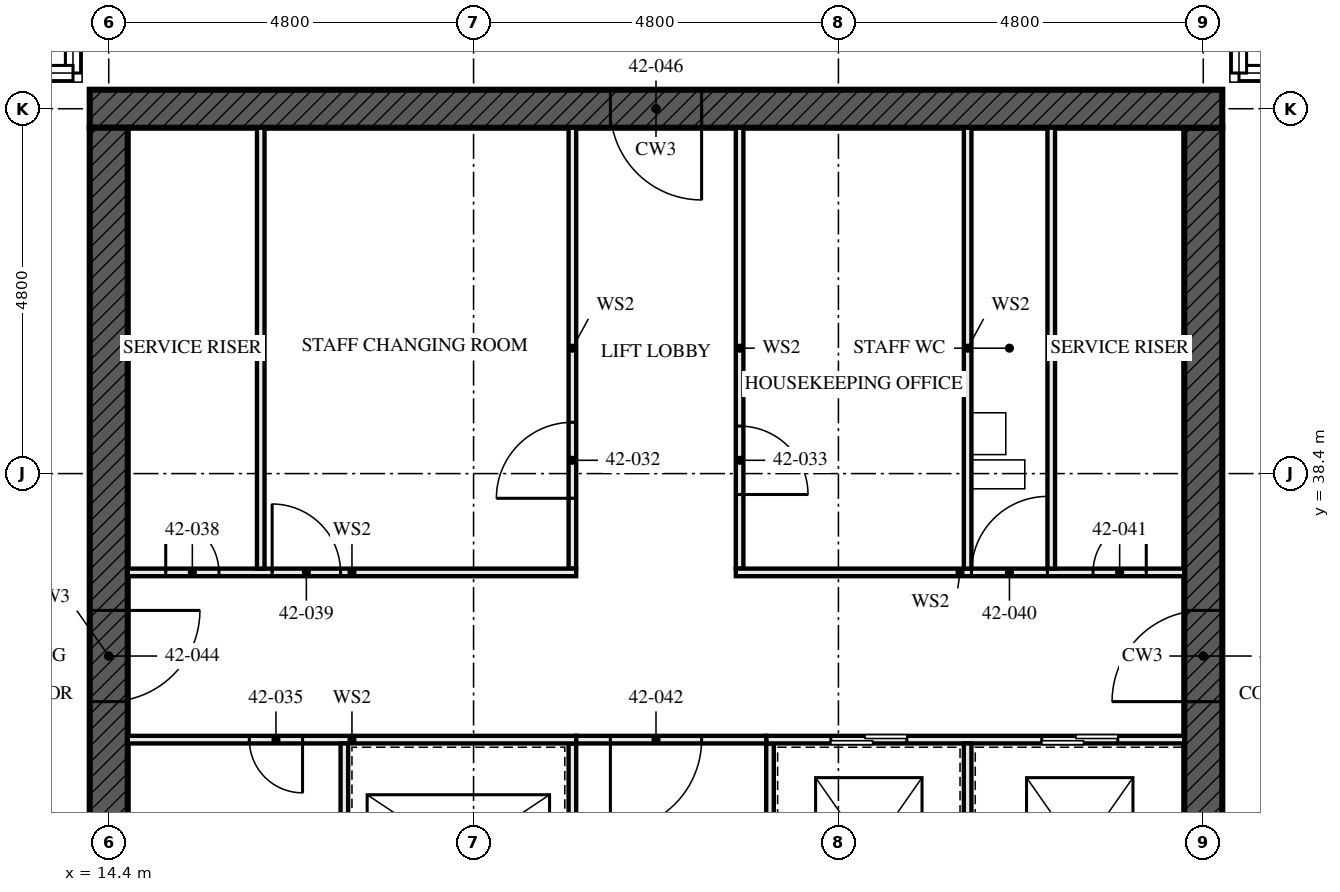
"""IFC4 building model, lengths in metres.
Left out: names, types, materials, properties, quantities, classifications, styles, units other than length and angle.
Written with IfcOpenShell. Run it as: python <this file> out.ifc"""

import sys

from ifc_helpers import new_model, si_unit, direction, frame, frame_2d, origin, place, context, subcontext, project, spatial, rectangle, extrude, element, fill, save


model = new_model("IFC4")
c1 = context("Model", 3, precision=1e-05, world=origin(), true_north=direction((0.0, 1.0)))
c2 = subcontext(c1, "Body", "Model", "MODEL_VIEW")
j1 = project(units=[si_unit("LENGTHUNIT", "METRE"), si_unit("PLANEANGLEUNIT", "RADIAN")], contexts=[c1])
p1 = place(None, origin())
s1 = spatial("IfcSite", under=j1, at=p1, CompositionType="ELEMENT")
p2 = place(p1, origin())
s2 = spatial("IfcBuilding", under=s1, at=p2, CompositionType="ELEMENT")
p3 = place(p2, frame((0.0, 0.0, 155.0)))
s3 = spatial("IfcBuildingStorey", under=s2, at=p3, CompositionType="ELEMENT", Elevation=155.0)
p4 = place(p3, frame((29.05, 43.2, -0.17), z_axis=(0.0, 0.0, 1.0), x_axis=(-1.0, 0.0, 0.0)))
e1 = element("IfcWall", 1, at=p4, inside=s3, PredefinedType="SHEAR", context=c2, shape_type="SweptSolid", body=[
    extrude(rectangle(XDim=14.9, YDim=0.5, at=frame_2d((7.45, 0.0))), origin(), (0.0, 0.0, 1.0), 3.5),
])
p5 = place(p4, frame((6.85, 0.0, 0.17)))
e2 = element("IfcOpeningElement", 2, at=p5, cuts=e1, PredefinedType="OPENING", context=c2, shape_type="SweptSolid", body=[
    extrude(rectangle(XDim=1.2, YDim=2.1, at=frame_2d((0.6, 1.05))), frame((0.0, 0.26, 0.0), z_axis=(0.0, -1.0, 0.0), x_axis=(1.0, 0.0, 0.0)), (0.0, 0.0, 1.0), 0.521),
])
p6 = place(p3, frame((14.4, 42.95, -0.17), z_axis=(0.0, 0.0, 1.0), x_axis=(0.0, -1.0, 0.0)))
e3 = element("IfcWall", 3, at=p6, inside=s3, PredefinedType="SHEAR", context=c2, shape_type="SweptSolid", body=[
    extrude(rectangle(XDim=13.9, YDim=0.5, at=frame_2d((6.95, 0.0))), origin(), (0.0, 0.0, 1.0), 3.5),
])
p7 = place(p6, frame((6.35, 0.0, 0.17)))
e4 = element("IfcOpeningElement", 4, at=p7, cuts=e3, PredefinedType="OPENING", context=c2, shape_type="SweptSolid", body=[
    extrude(rectangle(XDim=1.2, YDim=2.1, at=frame_2d((0.6, 1.05))), frame((0.0, 0.26, 0.0), z_axis=(0.0, -1.0, 0.0), x_axis=(1.0, 0.0, 0.0)), (0.0, 0.0, 1.0), 0.521),
])
p8 = place(p3, frame((28.8, 29.05, -0.17), z_axis=(0.0, 0.0, 1.0), x_axis=(0.0, 1.0, 0.0)))
e5 = element("IfcWall", 5, at=p8, inside=s3, PredefinedType="SHEAR", context=c2, shape_type="SweptSolid", body=[
    extrude(rectangle(XDim=13.9, YDim=0.5, at=frame_2d((6.95, 0.0))), origin(), (0.0, 0.0, 1.0), 3.5),
])
p9 = place(p8, frame((6.35, 0.0, 0.17)))
e6 = element("IfcOpeningElement", 6, at=p9, cuts=e5, PredefinedType="OPENING", context=c2, shape_type="SweptSolid", body=[
    extrude(rectangle(XDim=1.2, YDim=2.1, at=frame_2d((0.6, 1.05))), frame((0.0, 0.26, 0.0), z_axis=(0.0, -1.0, 0.0), x_axis=(1.0, 0.0, 0.0)), (0.0, 0.0, 1.0), 0.521),
])
for number, where, z_axis, x_axis in (
    (7, (16.4, 37.15, 0.0), (0.0, 0.0, 1.0), (0.0, 1.0, 0.0)),
    (8, (26.8, 37.15, 0.0), (0.0, 0.0, 1.0), (0.0, 1.0, 0.0)),
):
    element("IfcWall", number, at=place(p3, frame(where, z_axis=z_axis, x_axis=x_axis)), inside=s3, PredefinedType="SOLIDWALL", context=c2, shape_type="SweptSolid", body=[
        extrude(rectangle(XDim=5.8, YDim=0.1, at=frame_2d((2.9, 0.0))), origin(), (0.0, 0.0, 1.0), 3.33),
    ])
p10 = place(p3, frame((20.5, 29.05, 0.0), z_axis=(0.0, 0.0, 1.0), x_axis=(0.0, 1.0, 0.0)))
e9 = element("IfcWall", 9, at=p10, inside=s3, PredefinedType="SOLIDWALL", context=c2, shape_type="SweptSolid", body=[
    extrude(rectangle(XDim=5.8, YDim=0.1, at=frame_2d((2.9, 0.0))), origin(), (0.0, 0.0, 1.0), 3.33),
])
p11 = place(p10, frame((0.8, 0.0, 0.0)))
e10 = element("IfcOpeningElement", 10, at=p11, cuts=e9, PredefinedType="OPENING", context=c2, shape_type="SweptSolid", body=[
    extrude(rectangle(XDim=1.1, YDim=2.3, at=frame_2d((0.55, 1.15))), frame((0.0, 0.061, 0.0), z_axis=(0.0, -1.0, 0.0), x_axis=(1.0, 0.0, 0.0)), (0.0, 0.0, 1.0), 0.121),
])
p12 = place(p10, frame((3.775, 0.0, 0.0)))
e11 = element("IfcOpeningElement", 11, at=p12, cuts=e9, PredefinedType="OPENING", context=c2, shape_type="SweptSolid", body=[
    extrude(rectangle(XDim=1.1, YDim=2.3, at=frame_2d((0.55, 1.15))), frame((0.0, 0.061, 0.0), z_axis=(0.0, -1.0, 0.0), x_axis=(1.0, 0.0, 0.0)), (0.0, 0.0, 1.0), 0.121),
])
p13 = place(p3, frame((20.5, 37.15, 0.0), z_axis=(0.0, 0.0, 1.0), x_axis=(0.0, 1.0, 0.0)))
e12 = element("IfcWall", 12, at=p13, inside=s3, PredefinedType="SOLIDWALL", context=c2, shape_type="SweptSolid", body=[
    extrude(rectangle(XDim=5.8, YDim=0.1, at=frame_2d((2.9, 0.0))), origin(), (0.0, 0.0, 1.0), 3.33),
])
p14 = place(p13, frame((0.925, 0.0, 0.0)))
e13 = element("IfcOpeningElement", 13, at=p14, cuts=e12, PredefinedType="OPENING", context=c2, shape_type="SweptSolid", body=[
    extrude(rectangle(XDim=1.0, YDim=2.1, at=frame_2d((0.5, 1.05))), frame((0.0, 0.061, 0.0), z_axis=(0.0, -1.0, 0.0), x_axis=(1.0, 0.0, 0.0)), (0.0, 0.0, 1.0), 0.121),
])
p15 = place(p3, frame((22.7, 37.15, 0.0), z_axis=(0.0, 0.0, 1.0), x_axis=(0.0, 1.0, 0.0)))
e14 = element("IfcWall", 14, at=p15, inside=s3, PredefinedType="SOLIDWALL", context=c2, shape_type="SweptSolid", body=[
    extrude(rectangle(XDim=5.8, YDim=0.1, at=frame_2d((2.9, 0.0))), origin(), (0.0, 0.0, 1.0), 3.33),
])
p16 = place(p15, frame((0.975, 0.0, 0.0)))
e15 = element("IfcOpeningElement", 15, at=p16, cuts=e14, PredefinedType="OPENING", context=c2, shape_type="SweptSolid", body=[
    extrude(rectangle(XDim=0.9, YDim=2.1, at=frame_2d((0.45, 1.05))), frame((0.0, 0.061, 0.0), z_axis=(0.0, -1.0, 0.0), x_axis=(1.0, 0.0, 0.0)), (0.0, 0.0, 1.0), 0.121),
])
p17 = place(p3, frame((23.1, 29.05, 0.0), z_axis=(0.0, 0.0, 1.0), x_axis=(0.0, 1.0, 0.0)))
e16 = element("IfcWall", 16, at=p17, inside=s3, PredefinedType="SOLIDWALL", context=c2, shape_type="SweptSolid", body=[
    extrude(rectangle(XDim=5.8, YDim=0.1, at=frame_2d((2.9, 0.0))), origin(), (0.0, 0.0, 1.0), 3.33),
])
p18 = place(p17, frame((1.0, 0.0, 0.0)))
e17 = element("IfcOpeningElement", 17, at=p18, cuts=e16, PredefinedType="OPENING", context=c2, shape_type="SweptSolid", body=[
    extrude(rectangle(XDim=0.7, YDim=2.1, at=frame_2d((0.35, 1.05))), frame((0.0, 0.061, 0.0), z_axis=(0.0, -1.0, 0.0), x_axis=(1.0, 0.0, 0.0)), (0.0, 0.0, 1.0), 0.121),
])
p19 = place(p3, frame((14.65, 34.9, 0.0), z_axis=(0.0, 0.0, 1.0), x_axis=(1.0, 0.0, 0.0)))
e18 = element("IfcWall", 18, at=p19, inside=s3, PredefinedType="SOLIDWALL", context=c2, shape_type="SweptSolid", body=[
    extrude(rectangle(XDim=5.9, YDim=0.1, at=frame_2d((2.95, 0.0))), origin(), (0.0, 0.0, 1.0), 3.33),
])
p20 = place(p19, frame((1.6, 0.0, 0.0)))
e19 = element("IfcOpeningElement", 19, at=p20, cuts=e18, PredefinedType="OPENING", context=c2, shape_type="SweptSolid", body=[
    extrude(rectangle(XDim=0.7, YDim=2.1, at=frame_2d((0.35, 1.05))), frame((0.0, 0.061, 0.0), z_axis=(0.0, -1.0, 0.0), x_axis=(1.0, 0.0, 0.0)), (0.0, 0.0, 1.0), 0.121),
])
p21 = place(p3, frame((23.05, 34.9, 0.0), z_axis=(0.0, 0.0, 1.0), x_axis=(1.0, 0.0, 0.0)))
e20 = element("IfcWall", 20, at=p21, inside=s3, PredefinedType="SOLIDWALL", context=c2, shape_type="SweptSolid", body=[
    extrude(rectangle(XDim=5.5, YDim=0.1, at=frame_2d((2.75, 0.0))), origin(), (0.0, 0.0, 1.0), 3.33),
])
p22 = place(p21, frame((0.85, 0.0, 0.0)))
e21 = element("IfcOpeningElement", 21, at=p22, cuts=e20, PredefinedType="OPENING", context=c2, shape_type="SweptSolid", body=[
    extrude(rectangle(XDim=1.0, YDim=2.1, at=frame_2d((0.5, 1.05))), frame((0.0, 0.061, 0.0), z_axis=(0.0, -1.0, 0.0), x_axis=(1.0, 0.0, 0.0)), (0.0, 0.0, 1.0), 0.121),
])
p23 = place(p21, frame((3.625, 0.0, 0.0)))
e22 = element("IfcOpeningElement", 22, at=p23, cuts=e20, PredefinedType="OPENING", context=c2, shape_type="SweptSolid", body=[
    extrude(rectangle(XDim=1.0, YDim=2.1, at=frame_2d((0.5, 1.05))), frame((0.0, 0.061, 0.0), z_axis=(0.0, -1.0, 0.0), x_axis=(1.0, 0.0, 0.0)), (0.0, 0.0, 1.0), 0.121),
])
p24 = place(p3, frame((14.65, 37.1, 0.0), z_axis=(0.0, 0.0, 1.0), x_axis=(1.0, 0.0, 0.0)))
e23 = element("IfcWall", 23, at=p24, inside=s3, PredefinedType="SOLIDWALL", context=c2, shape_type="SweptSolid", body=[
    extrude(rectangle(XDim=5.9, YDim=0.1, at=frame_2d((2.95, 0.0))), origin(), (0.0, 0.0, 1.0), 3.33),
])
p25 = place(p24, frame((0.5, 0.0, 0.0)))
e24 = element("IfcOpeningElement", 24, at=p25, cuts=e23, PredefinedType="OPENING", context=c2, shape_type="SweptSolid", body=[
    extrude(rectangle(XDim=0.7, YDim=2.1, at=frame_2d((0.35, 1.05))), frame((0.0, 0.061, 0.0), z_axis=(0.0, -1.0, 0.0), x_axis=(1.0, 0.0, 0.0)), (0.0, 0.0, 1.0), 0.121),
])
p26 = place(p24, frame((1.9, 0.0, 0.0)))
e25 = element("IfcOpeningElement", 25, at=p26, cuts=e23, PredefinedType="OPENING", context=c2, shape_type="SweptSolid", body=[
    extrude(rectangle(XDim=0.9, YDim=2.1, at=frame_2d((0.45, 1.05))), frame((0.0, 0.061, 0.0), z_axis=(0.0, -1.0, 0.0), x_axis=(1.0, 0.0, 0.0)), (0.0, 0.0, 1.0), 0.121),
])
p27 = place(p3, frame((22.65, 37.1, 0.0), z_axis=(0.0, 0.0, 1.0), x_axis=(1.0, 0.0, 0.0)))
e26 = element("IfcWall", 26, at=p27, inside=s3, PredefinedType="SOLIDWALL", context=c2, shape_type="SweptSolid", body=[
    extrude(rectangle(XDim=5.9, YDim=0.1, at=frame_2d((2.95, 0.0))), origin(), (0.0, 0.0, 1.0), 3.33),
])
p28 = place(p27, frame((3.1, 0.0, 0.0)))
e27 = element("IfcOpeningElement", 27, at=p28, cuts=e26, PredefinedType="OPENING", context=c2, shape_type="SweptSolid", body=[
    extrude(rectangle(XDim=1.0, YDim=2.1, at=frame_2d((0.5, 1.05))), frame((0.0, 0.061, 0.0), z_axis=(0.0, -1.0, 0.0), x_axis=(1.0, 0.0, 0.0)), (0.0, 0.0, 1.0), 0.121),
])
p29 = place(p27, frame((4.7, 0.0, 0.0)))
e28 = element("IfcOpeningElement", 28, at=p29, cuts=e26, PredefinedType="OPENING", context=c2, shape_type="SweptSolid", body=[
    extrude(rectangle(XDim=0.7, YDim=2.1, at=frame_2d((0.35, 1.05))), frame((0.0, 0.061, 0.0), z_axis=(0.0, -1.0, 0.0), x_axis=(1.0, 0.0, 0.0)), (0.0, 0.0, 1.0), 0.121),
])
p30 = place(p3, frame((20.55, 34.9, 0.0), z_axis=(0.0, 0.0, 1.0), x_axis=(1.0, 0.0, 0.0)))
e29 = element("IfcWall", 29, at=p30, inside=s3, PredefinedType="SOLIDWALL", context=c2, shape_type="SweptSolid", body=[
    extrude(rectangle(XDim=2.5, YDim=0.1, at=frame_2d((1.25, 0.0))), origin(), (0.0, 0.0, 1.0), 3.33),
])
p31 = place(p30, frame((0.45, 0.0, 0.0)))
e30 = element("IfcOpeningElement", 30, at=p31, cuts=e29, PredefinedType="OPENING", context=c2, shape_type="SweptSolid", body=[
    extrude(rectangle(XDim=1.2, YDim=2.1, at=frame_2d((0.6, 1.05))), frame((0.0, 0.061, 0.0), z_axis=(0.0, -1.0, 0.0), x_axis=(1.0, 0.0, 0.0)), (0.0, 0.0, 1.0), 0.121),
])
for number, where, z_axis, x_axis in (
    (31, (17.5, 29.05, 0.0), (0.0, 0.0, 1.0), (0.0, 1.0, 0.0)),
    (32, (25.7, 37.15, 0.0), (0.0, 0.0, 1.0), (0.0, 1.0, 0.0)),
):
    element("IfcWall", number, at=place(p3, frame(where, z_axis=z_axis, x_axis=x_axis)), inside=s3, PredefinedType="SOLIDWALL", context=c2, shape_type="SweptSolid", body=[
        extrude(rectangle(XDim=5.8, YDim=0.1, at=frame_2d((2.9, 0.0))), origin(), (0.0, 0.0, 1.0), 3.33),
    ])
p32 = place(p3, frame((25.7, 31.95, 0.0), z_axis=(0.0, 0.0, 1.0), x_axis=(0.0, 1.0, 0.0)))
e33 = element("IfcWall", 33, at=p32, inside=s3, PredefinedType="SOLIDWALL", context=c2, shape_type="SweptSolid", body=[
    extrude(rectangle(XDim=2.9, YDim=0.1, at=frame_2d((1.45, 0.0))), origin(), (0.0, 0.0, 1.0), 3.33),
])
p33 = place(p14, origin())
e34 = element("IfcDoor", 34, at=p33, inside=s3, OperationType="SINGLE_SWING_RIGHT", PredefinedType="DOOR", context=c2, shape_type="SweptSolid", body=[
    extrude(rectangle(XDim=1.0, YDim=2.1, at=frame_2d((0.5, 1.05))), frame((0.0, 0.027, 0.0), z_axis=(0.0, -1.0, 0.0), x_axis=(1.0, 0.0, 0.0)), (0.0, 0.0, 1.0), 0.054),
])
fill(e13, e34)
p34 = place(p16, frame((0.9, 0.0, 0.0), z_axis=(0.0, 0.0, 1.0), x_axis=(-1.0, 0.0, 0.0)))
e35 = element("IfcDoor", 35, at=p34, inside=s3, OperationType="SINGLE_SWING_LEFT", PredefinedType="DOOR", context=c2, shape_type="SweptSolid", body=[
    extrude(rectangle(XDim=0.9, YDim=2.1, at=frame_2d((0.45, 1.05))), frame((0.0, 0.027, 0.0), z_axis=(0.0, -1.0, 0.0), x_axis=(1.0, 0.0, 0.0)), (0.0, 0.0, 1.0), 0.054),
])
fill(e15, e35)
p35 = place(p20, frame((0.7, 0.0, 0.0), z_axis=(0.0, 0.0, 1.0), x_axis=(-1.0, 0.0, 0.0)))
e36 = element("IfcDoor", 36, at=p35, inside=s3, OperationType="SINGLE_SWING_RIGHT", PredefinedType="DOOR", context=c2, shape_type="SweptSolid", body=[
    extrude(rectangle(XDim=0.7, YDim=2.1, at=frame_2d((0.35, 1.05))), frame((0.0, 0.027, 0.0), z_axis=(0.0, -1.0, 0.0), x_axis=(1.0, 0.0, 0.0)), (0.0, 0.0, 1.0), 0.054),
])
fill(e19, e36)
p36 = place(p22, origin())
e37 = element("IfcDoor", 37, at=p36, inside=s3, OperationType="SLIDING_TO_LEFT", PredefinedType="DOOR", context=c2, shape_type="SweptSolid", body=[
    extrude(rectangle(XDim=1.0, YDim=2.1, at=frame_2d((0.5, 1.05))), frame((0.0, 0.05, 0.0), z_axis=(0.0, -1.0, 0.0), x_axis=(1.0, 0.0, 0.0)), (0.0, 0.0, 1.0), 0.1),
])
fill(e21, e37)
p37 = place(p23, origin())
e38 = element("IfcDoor", 38, at=p37, inside=s3, OperationType="SLIDING_TO_LEFT", PredefinedType="DOOR", context=c2, shape_type="SweptSolid", body=[
    extrude(rectangle(XDim=1.0, YDim=2.1, at=frame_2d((0.5, 1.05))), frame((0.0, 0.05, 0.0), z_axis=(0.0, -1.0, 0.0), x_axis=(1.0, 0.0, 0.0)), (0.0, 0.0, 1.0), 0.1),
])
fill(e22, e38)
p38 = place(p25, origin())
e39 = element("IfcDoor", 39, at=p38, inside=s3, OperationType="SINGLE_SWING_RIGHT", PredefinedType="DOOR", context=c2, shape_type="SweptSolid", body=[
    extrude(rectangle(XDim=0.7, YDim=2.1, at=frame_2d((0.35, 1.05))), frame((0.0, 0.027, 0.0), z_axis=(0.0, -1.0, 0.0), x_axis=(1.0, 0.0, 0.0)), (0.0, 0.0, 1.0), 0.054),
])
fill(e24, e39)
p39 = place(p26, origin())
e40 = element("IfcDoor", 40, at=p39, inside=s3, OperationType="SINGLE_SWING_RIGHT", PredefinedType="DOOR", context=c2, shape_type="SweptSolid", body=[
    extrude(rectangle(XDim=0.9, YDim=2.1, at=frame_2d((0.45, 1.05))), frame((0.0, 0.027, 0.0), z_axis=(0.0, -1.0, 0.0), x_axis=(1.0, 0.0, 0.0)), (0.0, 0.0, 1.0), 0.054),
])
fill(e25, e40)
p40 = place(p28, origin())
e41 = element("IfcDoor", 41, at=p40, inside=s3, OperationType="SINGLE_SWING_LEFT", PredefinedType="DOOR", context=c2, shape_type="SweptSolid", body=[
    extrude(rectangle(XDim=1.0, YDim=2.1, at=frame_2d((0.5, 1.05))), frame((0.0, 0.027, 0.0), z_axis=(0.0, -1.0, 0.0), x_axis=(1.0, 0.0, 0.0)), (0.0, 0.0, 1.0), 0.054),
])
fill(e27, e41)
p41 = place(p29, origin())
e42 = element("IfcDoor", 42, at=p41, inside=s3, OperationType="SINGLE_SWING_LEFT", PredefinedType="DOOR", context=c2, shape_type="SweptSolid", body=[
    extrude(rectangle(XDim=0.7, YDim=2.1, at=frame_2d((0.35, 1.05))), frame((0.0, 0.027, 0.0), z_axis=(0.0, -1.0, 0.0), x_axis=(1.0, 0.0, 0.0)), (0.0, 0.0, 1.0), 0.054),
])
fill(e28, e42)
p42 = place(p31, frame((1.2, 0.0, 0.0), z_axis=(0.0, 0.0, 1.0), x_axis=(-1.0, 0.0, 0.0)))
e43 = element("IfcDoor", 43, at=p42, inside=s3, OperationType="SINGLE_SWING_LEFT", PredefinedType="DOOR", context=c2, shape_type="SweptSolid", body=[
    extrude(rectangle(XDim=1.2, YDim=2.1, at=frame_2d((0.6, 1.05))), frame((0.0, 0.027, 0.0), z_axis=(0.0, -1.0, 0.0), x_axis=(1.0, 0.0, 0.0)), (0.0, 0.0, 1.0), 0.054),
])
fill(e30, e43)
p43 = place(p7, origin())
e44 = element("IfcDoor", 44, at=p43, inside=s3, OperationType="SINGLE_SWING_LEFT", PredefinedType="DOOR", context=c2, shape_type="SweptSolid", body=[
    extrude(rectangle(XDim=1.2, YDim=2.1, at=frame_2d((0.6, 1.05))), frame((0.0, 0.027, 0.0), z_axis=(0.0, -1.0, 0.0), x_axis=(1.0, 0.0, 0.0)), (0.0, 0.0, 1.0), 0.054),
])
fill(e4, e44)
p44 = place(p9, origin())
e45 = element("IfcDoor", 45, at=p44, inside=s3, OperationType="SINGLE_SWING_LEFT", PredefinedType="DOOR", context=c2, shape_type="SweptSolid", body=[
    extrude(rectangle(XDim=1.2, YDim=2.1, at=frame_2d((0.6, 1.05))), frame((0.0, 0.027, 0.0), z_axis=(0.0, -1.0, 0.0), x_axis=(1.0, 0.0, 0.0)), (0.0, 0.0, 1.0), 0.054),
])
fill(e6, e45)
p45 = place(p5, origin())
e46 = element("IfcDoor", 46, at=p45, inside=s3, OperationType="SINGLE_SWING_LEFT", PredefinedType="DOOR", context=c2, shape_type="SweptSolid", body=[
    extrude(rectangle(XDim=1.2, YDim=2.1, at=frame_2d((0.6, 1.05))), frame((0.0, 0.027, 0.0), z_axis=(0.0, -1.0, 0.0), x_axis=(1.0, 0.0, 0.0)), (0.0, 0.0, 1.0), 0.054),
])
fill(e2, e46)
save(model, sys.argv[1])
